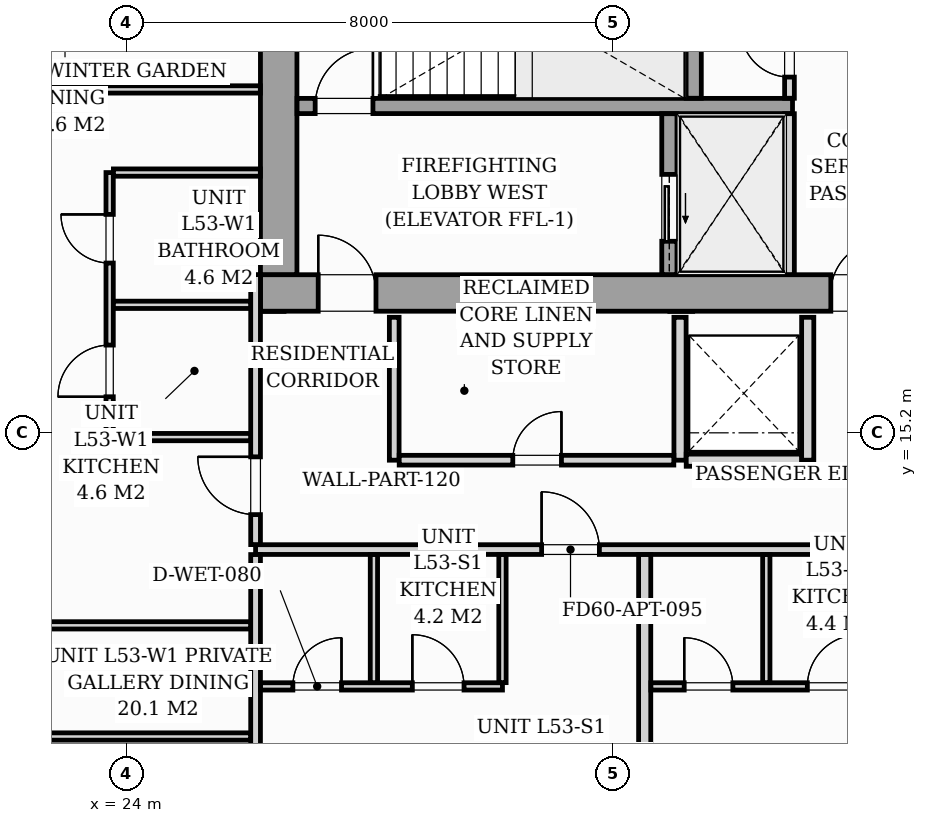
"""IFC4 building model, lengths in metres.
Left out: names, types, materials, properties, quantities, classifications, styles, units other than length and angle.
Written with IfcOpenShell. Run it as: python <this file> out.ifc"""

import sys

from ifc_helpers import new_model, si_unit, direction, frame, frame_2d, origin, origin_2d, place, context, subcontext, project, spatial, rectangle, i_section, extrude, source, transform, mapped, element, fill, save


model = new_model("IFC4")
c1 = context("Model", 3, precision=1e-05, world=origin(), true_north=direction((0.0, 1.0)))
c2 = subcontext(c1, "Body", "Model", "MODEL_VIEW")
j1 = project(units=[si_unit("LENGTHUNIT", "METRE"), si_unit("PLANEANGLEUNIT", "RADIAN")], contexts=[c1])
p1 = place(None, origin())
s1 = spatial("IfcSite", under=j1, at=p1, CompositionType="ELEMENT")
p2 = place(p1, origin())
s2 = spatial("IfcBuilding", under=s1, at=p2, CompositionType="ELEMENT")
p3 = place(p2, frame((0.0, 0.0, 185.8)))
s3 = spatial("IfcBuildingStorey", under=s2, at=p3, CompositionType="ELEMENT", Elevation=185.8)
m1 = source(origin(), c2, "Body", "SweptSolid", [
    extrude(i_section(OverallWidth=0.416, OverallDepth=0.446, WebThickness=0.039, FlangeThickness=0.063, FilletRadius=0.018, at=origin_2d()), origin(), (0.0, 0.0, 1.0), 3.196),
])
for number, where, z_axis, x_axis in (
    (1, (26.4, 17.4, 0.002), (0.0, 0.0, 1.0), (1.0, 0.0, 0.0)),
    (2, (33.12, 17.4, 0.002), (0.0, 0.0, 1.0), (1.0, 0.0, 0.0)),
):
    element("IfcColumn", number, at=place(p3, frame(where, z_axis=z_axis, x_axis=x_axis)), inside=s3, PredefinedType="PILASTER", context=c2, shape_type="MappedRepresentation", body=[
        mapped(m1, transform((0.0, 0.0, 0.0), scale=1.0)),
    ])
p4 = place(p3, frame((26.2, 17.5, 0.0), z_axis=(0.0, 0.0, 1.0), x_axis=(1.0, 0.0, 0.0)))
e3 = element("IfcWall", 3, at=p4, inside=s3, PredefinedType="SHEAR", context=c2, shape_type="SweptSolid", body=[
    extrude(rectangle(XDim=19.6, YDim=0.6, at=frame_2d((9.8, 0.0))), origin(), (0.0, 0.0, 1.0), 3.2),
])
p5 = place(p4, frame((0.95, 0.0, 0.0)))
e4 = element("IfcOpeningElement", 4, at=p5, cuts=e3, PredefinedType="OPENING", context=c2, shape_type="SweptSolid", body=[
    extrude(rectangle(XDim=0.95, YDim=2.06, at=frame_2d((0.475, 1.03))), frame((0.0, 0.31, 0.0), z_axis=(0.0, -1.0, 0.0), x_axis=(1.0, 0.0, 0.0)), (0.0, 0.0, 1.0), 0.62),
])
p6 = place(p4, frame((9.38, 0.0, 0.0)))
e5 = element("IfcOpeningElement", 5, at=p6, cuts=e3, PredefinedType="OPENING", context=c2, shape_type="SweptSolid", body=[
    extrude(rectangle(XDim=0.85, YDim=2.0, at=frame_2d((0.425, 1.0))), frame((0.0, 0.31, 0.0), z_axis=(0.0, -1.0, 0.0), x_axis=(1.0, 0.0, 0.0)), (0.0, 0.0, 1.0), 0.62),
])
p7 = place(p4, frame((17.55, 0.0, 0.0)))
e6 = element("IfcOpeningElement", 6, at=p7, cuts=e3, PredefinedType="OPENING", context=c2, shape_type="SweptSolid", body=[
    extrude(rectangle(XDim=0.95, YDim=2.06, at=frame_2d((0.475, 1.03))), frame((0.0, 0.31, 0.0), z_axis=(0.0, -1.0, 0.0), x_axis=(1.0, 0.0, 0.0)), (0.0, 0.0, 1.0), 0.62),
])
p8 = place(p3, frame((26.5, 17.802, 0.0), z_axis=(0.0, 0.0, 1.0), x_axis=(0.0, 1.0, 0.0)))
e7 = element("IfcWall", 7, at=p8, inside=s3, PredefinedType="SHEAR", context=c2, shape_type="SweptSolid", body=[
    extrude(rectangle(XDim=5.796, YDim=0.6, at=frame_2d((2.898, 0.0))), origin(), (0.0, 0.0, 1.0), 3.2),
])
p9 = place(p3, frame((26.802, 20.575, 0.0), z_axis=(0.0, 0.0, 1.0), x_axis=(1.0, 0.0, 0.0)))
e8 = element("IfcWall", 8, at=p9, inside=s3, PredefinedType="SOLIDWALL", context=c2, shape_type="SweptSolid", body=[
    extrude(rectangle(XDim=8.148, YDim=0.25, at=frame_2d((4.074, 0.0))), origin(), (0.0, 0.0, 1.0), 3.2),
])
p10 = place(p9, frame((0.298, 0.0, 0.0)))
e9 = element("IfcOpeningElement", 9, at=p10, cuts=e8, PredefinedType="OPENING", context=c2, shape_type="SweptSolid", body=[
    extrude(rectangle(XDim=0.95, YDim=2.06, at=frame_2d((0.475, 1.03))), frame((0.0, 0.135, 0.0), z_axis=(0.0, -1.0, 0.0), x_axis=(1.0, 0.0, 0.0)), (0.0, 0.0, 1.0), 0.27),
])
p11 = place(p3, frame((33.325, 20.702, 0.0), z_axis=(0.0, 0.0, 1.0), x_axis=(0.0, 1.0, 0.0)))
e10 = element("IfcWall", 10, at=p11, inside=s3, PredefinedType="SOLIDWALL", context=c2, shape_type="SweptSolid", body=[
    extrude(rectangle(XDim=2.896, YDim=0.25, at=frame_2d((1.448, 0.0))), origin(), (0.0, 0.0, 1.0), 3.2),
])
p12 = place(p3, frame((32.925, 17.802, 0.0), z_axis=(0.0, 0.0, 1.0), x_axis=(0.0, 1.0, 0.0)))
e11 = element("IfcWall", 11, at=p12, inside=s3, PredefinedType="SOLIDWALL", context=c2, shape_type="SweptSolid", body=[
    extrude(rectangle(XDim=2.646, YDim=0.25, at=frame_2d((1.323, 0.0))), origin(), (0.0, 0.0, 1.0), 3.2),
])
p13 = place(p12, frame((0.548, 0.0, 0.0)))
e12 = element("IfcOpeningElement", 12, at=p13, cuts=e11, PredefinedType="OPENING", context=c2, shape_type="SweptSolid", body=[
    extrude(rectangle(XDim=1.1, YDim=2.08, at=frame_2d((0.55, 1.04))), frame((0.0, 0.135, 0.0), z_axis=(0.0, -1.0, 0.0), x_axis=(1.0, 0.0, 0.0)), (0.0, 0.0, 1.0), 0.27),
])
p14 = place(p3, frame((34.9, 17.802, 0.0), z_axis=(0.0, 0.0, 1.0), x_axis=(0.0, 1.0, 0.0)))
e13 = element("IfcWall", 13, at=p14, inside=s3, PredefinedType="PARTITIONING", context=c2, shape_type="SweptSolid", body=[
    extrude(rectangle(XDim=2.646, YDim=0.16, at=frame_2d((1.323, 0.0))), origin(), (0.0, 0.0, 1.0), 2.94),
])
p15 = place(p3, frame((34.9, 20.702, 0.0), z_axis=(0.0, 0.0, 1.0), x_axis=(0.0, 1.0, 0.0)))
e14 = element("IfcWall", 14, at=p15, inside=s3, PredefinedType="PARTITIONING", context=c2, shape_type="SweptSolid", body=[
    extrude(rectangle(XDim=2.896, YDim=0.16, at=frame_2d((1.448, 0.0))), origin(), (0.0, 0.0, 1.0), 2.94),
])
p16 = place(p15, frame((0.348, 0.0, 0.0)))
e15 = element("IfcOpeningElement", 15, at=p16, cuts=e14, PredefinedType="OPENING", context=c2, shape_type="SweptSolid", body=[
    extrude(rectangle(XDim=0.8, YDim=2.05, at=frame_2d((0.4, 1.025))), frame((0.0, 0.09, 0.0), z_axis=(0.0, -1.0, 0.0), x_axis=(1.0, 0.0, 0.0)), (0.0, 0.0, 1.0), 0.18),
])
p17 = place(p3, frame((28.4, 14.75, 0.0), z_axis=(0.0, 0.0, 1.0), x_axis=(0.0, 1.0, 0.0)))
e16 = element("IfcWall", 16, at=p17, inside=s3, PredefinedType="PARTITIONING", context=c2, shape_type="SweptSolid", body=[
    extrude(rectangle(XDim=2.35, YDim=0.16, at=frame_2d((1.175, 0.0))), origin(), (0.0, 0.0, 1.0), 2.94),
])
p18 = place(p3, frame((33.1, 14.75, 0.0), z_axis=(0.0, 0.0, 1.0), x_axis=(0.0, 1.0, 0.0)))
e17 = element("IfcWall", 17, at=p18, inside=s3, PredefinedType="PARTITIONING", context=c2, shape_type="SweptSolid", body=[
    extrude(rectangle(XDim=2.35, YDim=0.2, at=frame_2d((1.175, 0.0))), origin(), (0.0, 0.0, 1.0), 2.94),
])
p19 = place(p3, frame((28.482, 14.75, 0.0), z_axis=(0.0, 0.0, 1.0), x_axis=(1.0, 0.0, 0.0)))
e18 = element("IfcWall", 18, at=p19, inside=s3, PredefinedType="PARTITIONING", context=c2, shape_type="SweptSolid", body=[
    extrude(rectangle(XDim=4.516, YDim=0.16, at=frame_2d((2.258, 0.0))), origin(), (0.0, 0.0, 1.0), 2.94),
])
p20 = place(p19, frame((1.868, 0.0, 0.0)))
e19 = element("IfcOpeningElement", 19, at=p20, cuts=e18, PredefinedType="OPENING", context=c2, shape_type="SweptSolid", body=[
    extrude(rectangle(XDim=0.8, YDim=2.05, at=frame_2d((0.4, 1.025))), frame((0.0, 0.09, 0.0), z_axis=(0.0, -1.0, 0.0), x_axis=(1.0, 0.0, 0.0)), (0.0, 0.0, 1.0), 0.18),
])
p21 = place(p3, frame((35.2, 14.75, 0.0), z_axis=(0.0, 0.0, 1.0), x_axis=(0.0, 1.0, 0.0)))
e20 = element("IfcWall", 20, at=p21, inside=s3, PredefinedType="PARTITIONING", context=c2, shape_type="SweptSolid", body=[
    extrude(rectangle(XDim=2.35, YDim=0.2, at=frame_2d((1.175, 0.0))), origin(), (0.0, 0.0, 1.0), 2.94),
])
p22 = place(p3, frame((33.202, 14.75, 0.0), z_axis=(0.0, 0.0, 1.0), x_axis=(1.0, 0.0, 0.0)))
e21 = element("IfcWall", 21, at=p22, inside=s3, PredefinedType="PARTITIONING", context=c2, shape_type="SweptSolid", body=[
    extrude(rectangle(XDim=1.896, YDim=0.2, at=frame_2d((0.948, 0.0))), origin(), (0.0, 0.0, 1.0), 2.94),
])
p23 = place(p3, frame((26.12, 13.28, 0.0), z_axis=(0.0, 0.0, 1.0), x_axis=(1.0, 0.0, 0.0)))
e22 = element("IfcWall", 22, at=p23, inside=s3, PredefinedType="PARTITIONING", context=c2, shape_type="SweptSolid", body=[
    extrude(rectangle(XDim=21.33, YDim=0.16, at=frame_2d((10.665, 0.0))), origin(), (0.0, 0.0, 1.0), 2.94),
])
p24 = place(p23, frame((4.704, 0.0, 0.0)))
e23 = element("IfcOpeningElement", 23, at=p24, cuts=e22, PredefinedType="OPENING", context=c2, shape_type="SweptSolid", body=[
    extrude(rectangle(XDim=0.95, YDim=2.06, at=frame_2d((0.475, 1.03))), frame((0.0, 0.09, 0.0), z_axis=(0.0, -1.0, 0.0), x_axis=(1.0, 0.0, 0.0)), (0.0, 0.0, 1.0), 0.18),
])
p25 = place(p23, frame((11.6, 0.0, 0.0)))
e24 = element("IfcOpeningElement", 24, at=p25, cuts=e22, PredefinedType="OPENING", context=c2, shape_type="SweptSolid", body=[
    extrude(rectangle(XDim=0.95, YDim=2.06, at=frame_2d((0.475, 1.03))), frame((0.0, 0.09, 0.0), z_axis=(0.0, -1.0, 0.0), x_axis=(1.0, 0.0, 0.0)), (0.0, 0.0, 1.0), 0.18),
])
p26 = place(p23, frame((14.976, 0.0, 0.0)))
e25 = element("IfcOpeningElement", 25, at=p26, cuts=e22, PredefinedType="OPENING", context=c2, shape_type="SweptSolid", body=[
    extrude(rectangle(XDim=0.95, YDim=2.06, at=frame_2d((0.475, 1.03))), frame((0.0, 0.09, 0.0), z_axis=(0.0, -1.0, 0.0), x_axis=(1.0, 0.0, 0.0)), (0.0, 0.0, 1.0), 0.18),
])
p27 = place(p3, frame((26.12, 7.261, 0.0), z_axis=(0.0, 0.0, 1.0), x_axis=(0.0, 1.0, 0.0)))
e26 = element("IfcWall", 26, at=p27, inside=s3, PredefinedType="PARTITIONING", context=c2, shape_type="SweptSolid", body=[
    extrude(rectangle(XDim=5.937, YDim=0.16, at=frame_2d((2.968, 0.0))), origin(), (0.0, 0.0, 1.0), 2.94),
])
p28 = place(p3, frame((26.12, 13.362, 0.0), z_axis=(0.0, 0.0, 1.0), x_axis=(0.0, 1.0, 0.0)))
e27 = element("IfcWall", 27, at=p28, inside=s3, PredefinedType="PARTITIONING", context=c2, shape_type="SweptSolid", body=[
    extrude(rectangle(XDim=4.44, YDim=0.16, at=frame_2d((2.22, 0.0))), origin(), (0.0, 0.0, 1.0), 2.94),
])
p29 = place(p28, frame((0.493, 0.0, 0.0)))
e28 = element("IfcOpeningElement", 28, at=p29, cuts=e27, PredefinedType="OPENING", context=c2, shape_type="SweptSolid", body=[
    extrude(rectangle(XDim=0.95, YDim=2.06, at=frame_2d((0.475, 1.03))), frame((0.0, 0.09, 0.0), z_axis=(0.0, -1.0, 0.0), x_axis=(1.0, 0.0, 0.0)), (0.0, 0.0, 1.0), 0.18),
])
p30 = place(p3, frame((26.202, 11.03, 0.0), z_axis=(0.0, 0.0, 1.0), x_axis=(1.0, 0.0, 0.0)))
e29 = element("IfcWall", 29, at=p30, inside=s3, PredefinedType="PARTITIONING", context=c2, shape_type="SweptSolid", body=[
    extrude(rectangle(XDim=3.978, YDim=0.12, at=frame_2d((1.989, 0.0))), origin(), (0.0, 0.0, 1.0), 2.94),
])
p31 = place(p30, frame((0.531, 0.0, 0.0)))
e30 = element("IfcOpeningElement", 30, at=p31, cuts=e29, PredefinedType="OPENING", context=c2, shape_type="SweptSolid", body=[
    extrude(rectangle(XDim=0.8, YDim=2.02, at=frame_2d((0.4, 1.01))), frame((0.0, 0.07, 0.0), z_axis=(0.0, -1.0, 0.0), x_axis=(1.0, 0.0, 0.0)), (0.0, 0.0, 1.0), 0.14),
])
p32 = place(p30, frame((2.496, 0.0, 0.0)))
e31 = element("IfcOpeningElement", 31, at=p32, cuts=e29, PredefinedType="OPENING", context=c2, shape_type="SweptSolid", body=[
    extrude(rectangle(XDim=0.85, YDim=2.05, at=frame_2d((0.425, 1.025))), frame((0.0, 0.07, 0.0), z_axis=(0.0, -1.0, 0.0), x_axis=(1.0, 0.0, 0.0)), (0.0, 0.0, 1.0), 0.14),
])
for number, where, z_axis, x_axis in (
    (32, (30.18, 11.092, 0.0), (0.0, 0.0, 1.0), (0.0, 1.0, 0.0)),
    (33, (28.066, 11.092, 0.0), (0.0, 0.0, 1.0), (0.0, 1.0, 0.0)),
):
    element("IfcWall", number, at=place(p3, frame(where, z_axis=z_axis, x_axis=x_axis)), inside=s3, PredefinedType="PARTITIONING", context=c2, shape_type="SweptSolid", body=[
        extrude(rectangle(XDim=2.106, YDim=0.12, at=frame_2d((1.053, 0.0))), origin(), (0.0, 0.0, 1.0), 2.94),
    ])
p33 = place(p3, frame((32.519, 7.877, 0.0), z_axis=(0.0, 0.0, 1.0), x_axis=(0.0, 1.0, 0.0)))
e34 = element("IfcWall", 34, at=p33, inside=s3, PredefinedType="PARTITIONING", context=c2, shape_type="SweptSolid", body=[
    extrude(rectangle(XDim=5.321, YDim=0.2, at=frame_2d((2.66, 0.0))), origin(), (0.0, 0.0, 1.0), 2.94),
])
p34 = place(p3, frame((32.621, 11.03, 0.0), z_axis=(0.0, 0.0, 1.0), x_axis=(1.0, 0.0, 0.0)))
e35 = element("IfcWall", 35, at=p34, inside=s3, PredefinedType="PARTITIONING", context=c2, shape_type="SweptSolid", body=[
    extrude(rectangle(XDim=4.098, YDim=0.12, at=frame_2d((2.049, 0.0))), origin(), (0.0, 0.0, 1.0), 2.94),
])
p35 = place(p34, frame((0.548, 0.0, 0.0)))
e36 = element("IfcOpeningElement", 36, at=p35, cuts=e35, PredefinedType="OPENING", context=c2, shape_type="SweptSolid", body=[
    extrude(rectangle(XDim=0.8, YDim=2.02, at=frame_2d((0.4, 1.01))), frame((0.0, 0.07, 0.0), z_axis=(0.0, -1.0, 0.0), x_axis=(1.0, 0.0, 0.0)), (0.0, 0.0, 1.0), 0.14),
])
p36 = place(p34, frame((2.573, 0.0, 0.0)))
e37 = element("IfcOpeningElement", 37, at=p36, cuts=e35, PredefinedType="OPENING", context=c2, shape_type="SweptSolid", body=[
    extrude(rectangle(XDim=0.85, YDim=2.05, at=frame_2d((0.425, 1.025))), frame((0.0, 0.07, 0.0), z_axis=(0.0, -1.0, 0.0), x_axis=(1.0, 0.0, 0.0)), (0.0, 0.0, 1.0), 0.14),
])
p37 = place(p3, frame((34.519, 11.092, 0.0), z_axis=(0.0, 0.0, 1.0), x_axis=(0.0, 1.0, 0.0)))
e38 = element("IfcWall", 38, at=p37, inside=s3, PredefinedType="PARTITIONING", context=c2, shape_type="SweptSolid", body=[
    extrude(rectangle(XDim=2.106, YDim=0.12, at=frame_2d((1.053, 0.0))), origin(), (0.0, 0.0, 1.0), 2.94),
])
p38 = place(p3, frame((23.72, 15.13, 0.0), z_axis=(0.0, 0.0, 1.0), x_axis=(0.0, 1.0, 0.0)))
e39 = element("IfcWall", 39, at=p38, inside=s3, PredefinedType="PARTITIONING", context=c2, shape_type="SweptSolid", body=[
    extrude(rectangle(XDim=4.35, YDim=0.12, at=frame_2d((2.175, 0.0))), origin(), (0.0, 0.0, 1.0), 2.94),
])
p39 = place(p38, frame((0.663, 0.0, 0.0)))
e40 = element("IfcOpeningElement", 40, at=p39, cuts=e39, PredefinedType="OPENING", context=c2, shape_type="SweptSolid", body=[
    extrude(rectangle(XDim=0.85, YDim=2.05, at=frame_2d((0.425, 1.025))), frame((0.0, 0.07, 0.0), z_axis=(0.0, -1.0, 0.0), x_axis=(1.0, 0.0, 0.0)), (0.0, 0.0, 1.0), 0.14),
])
p40 = place(p38, frame((2.862, 0.0, 0.0)))
e41 = element("IfcOpeningElement", 41, at=p40, cuts=e39, PredefinedType="OPENING", context=c2, shape_type="SweptSolid", body=[
    extrude(rectangle(XDim=0.8, YDim=2.02, at=frame_2d((0.4, 1.01))), frame((0.0, 0.07, 0.0), z_axis=(0.0, -1.0, 0.0), x_axis=(1.0, 0.0, 0.0)), (0.0, 0.0, 1.0), 0.14),
])
p41 = place(p3, frame((23.782, 17.305, 0.0), z_axis=(0.0, 0.0, 1.0), x_axis=(1.0, 0.0, 0.0)))
e42 = element("IfcWall", 42, at=p41, inside=s3, PredefinedType="PARTITIONING", context=c2, shape_type="SweptSolid", body=[
    extrude(rectangle(XDim=2.256, YDim=0.12, at=frame_2d((1.128, 0.0))), origin(), (0.0, 0.0, 1.0), 2.281),
])
p42 = place(p3, frame((23.782, 15.13, 0.0), z_axis=(0.0, 0.0, 1.0), x_axis=(1.0, 0.0, 0.0)))
e43 = element("IfcWall", 43, at=p42, inside=s3, PredefinedType="PARTITIONING", context=c2, shape_type="SweptSolid", body=[
    extrude(rectangle(XDim=2.256, YDim=0.12, at=frame_2d((1.128, 0.0))), origin(), (0.0, 0.0, 1.0), 2.94),
])
p43 = place(p3, frame((23.782, 19.48, 0.0), z_axis=(0.0, 0.0, 1.0), x_axis=(1.0, 0.0, 0.0)))
e44 = element("IfcWall", 44, at=p43, inside=s3, PredefinedType="PARTITIONING", context=c2, shape_type="SweptSolid", body=[
    extrude(rectangle(XDim=2.416, YDim=0.12, at=frame_2d((1.208, 0.0))), origin(), (0.0, 0.0, 1.0), 2.94),
])
p44 = place(p3, frame((14.365, 10.206, 0.0), z_axis=(0.0, 0.0, 1.0), x_axis=(1.0, 0.0, 0.0)))
e45 = element("IfcWall", 45, at=p44, inside=s3, PredefinedType="PARTITIONING", context=c2, shape_type="SweptSolid", body=[
    extrude(rectangle(XDim=11.673, YDim=0.12, at=frame_2d((5.837, 0.0))), origin(), (0.0, 0.0, 1.0), 2.94),
])
p45 = place(p44, frame((5.405, 0.0, 0.0)))
e46 = element("IfcOpeningElement", 46, at=p45, cuts=e45, PredefinedType="OPENING", context=c2, shape_type="SweptSolid", body=[
    extrude(rectangle(XDim=0.85, YDim=2.05, at=frame_2d((0.425, 1.025))), frame((0.0, 0.07, 0.0), z_axis=(0.0, -1.0, 0.0), x_axis=(1.0, 0.0, 0.0)), (0.0, 0.0, 1.0), 0.14),
])
p46 = place(p3, frame((14.189, 12.034, 0.0), z_axis=(0.0, 0.0, 1.0), x_axis=(1.0, 0.0, 0.0)))
e47 = element("IfcWall", 47, at=p46, inside=s3, PredefinedType="PARTITIONING", context=c2, shape_type="SweptSolid", body=[
    extrude(rectangle(XDim=11.849, YDim=0.12, at=frame_2d((5.925, 0.0))), origin(), (0.0, 0.0, 1.0), 2.94),
])
p47 = place(p46, frame((5.493, 0.0, 0.0)))
e48 = element("IfcOpeningElement", 48, at=p47, cuts=e47, PredefinedType="OPENING", context=c2, shape_type="SweptSolid", body=[
    extrude(rectangle(XDim=0.85, YDim=2.05, at=frame_2d((0.425, 1.025))), frame((0.0, 0.07, 0.0), z_axis=(0.0, -1.0, 0.0), x_axis=(1.0, 0.0, 0.0)), (0.0, 0.0, 1.0), 0.14),
])
p48 = place(p3, frame((13.34, 20.847, 0.0), z_axis=(0.0, 0.0, 1.0), x_axis=(1.0, 0.0, 0.0)))
e49 = element("IfcWall", 49, at=p48, inside=s3, PredefinedType="PARTITIONING", context=c2, shape_type="SweptSolid", body=[
    extrude(rectangle(XDim=12.858, YDim=0.12, at=frame_2d((6.429, 0.0))), origin(), (0.0, 0.0, 1.0), 2.94),
])
p49 = place(p48, frame((5.875, 0.0, 0.0)))
e50 = element("IfcOpeningElement", 50, at=p49, cuts=e49, PredefinedType="OPENING", context=c2, shape_type="SweptSolid", body=[
    extrude(rectangle(XDim=0.85, YDim=2.05, at=frame_2d((0.425, 1.025))), frame((0.0, 0.07, 0.0), z_axis=(0.0, -1.0, 0.0), x_axis=(1.0, 0.0, 0.0)), (0.0, 0.0, 1.0), 0.14),
])
m2 = source(origin(), c2, "Body", "SweptSolid", [
    extrude(rectangle(XDim=0.95, YDim=2.06, at=frame_2d((0.475, 1.03))), frame((0.0, 0.025, 0.0), z_axis=(0.0, -1.0, 0.0), x_axis=(1.0, 0.0, 0.0)), (0.0, 0.0, 1.0), 0.05),
])
p50 = place(p5, origin())
e51 = element("IfcDoor", 51, at=p50, inside=s3, OperationType="SINGLE_SWING_LEFT", PredefinedType="DOOR", context=c2, shape_type="MappedRepresentation", body=[
    mapped(m2, transform((0.0, 0.0, 0.0), scale=1.0)),
])
fill(e4, e51)
m3 = source(origin(), c2, "Body", "SweptSolid", [
    extrude(rectangle(XDim=0.85, YDim=2.0, at=frame_2d((0.425, 1.0))), frame((0.0, 0.025, 0.0), z_axis=(0.0, -1.0, 0.0), x_axis=(1.0, 0.0, 0.0)), (0.0, 0.0, 1.0), 0.05),
])
p51 = place(p6, origin())
e52 = element("IfcDoor", 52, at=p51, inside=s3, OperationType="SINGLE_SWING_RIGHT", PredefinedType="DOOR", context=c2, shape_type="MappedRepresentation", body=[
    mapped(m3, transform((0.0, 0.0, 0.0), scale=1.0)),
])
fill(e5, e52)
p52 = place(p10, origin())
e53 = element("IfcDoor", 53, at=p52, inside=s3, OperationType="SINGLE_SWING_RIGHT", PredefinedType="DOOR", context=c2, shape_type="MappedRepresentation", body=[
    mapped(m2, transform((0.0, 0.0, 0.0), scale=1.0)),
])
fill(e9, e53)
m4 = source(origin(), c2, "Body", "SweptSolid", [
    extrude(rectangle(XDim=1.1, YDim=2.08, at=frame_2d((0.55, 1.04))), frame((0.0, 0.025, 0.0), z_axis=(0.0, -1.0, 0.0), x_axis=(1.0, 0.0, 0.0)), (0.0, 0.0, 1.0), 0.05),
])
p53 = place(p13, origin())
e54 = element("IfcDoor", 54, at=p53, inside=s3, OperationType="SLIDING_TO_LEFT", PredefinedType="DOOR", context=c2, shape_type="MappedRepresentation", body=[
    mapped(m4, transform((0.0, 0.0, 0.0), scale=1.0)),
])
fill(e12, e54)
m5 = source(origin(), c2, "Body", "SweptSolid", [
    extrude(rectangle(XDim=0.8, YDim=2.05, at=frame_2d((0.4, 1.025))), frame((0.0, 0.025, 0.0), z_axis=(0.0, -1.0, 0.0), x_axis=(1.0, 0.0, 0.0)), (0.0, 0.0, 1.0), 0.05),
])
p54 = place(p16, origin())
e55 = element("IfcDoor", 55, at=p54, inside=s3, OperationType="SINGLE_SWING_RIGHT", PredefinedType="DOOR", context=c2, shape_type="MappedRepresentation", body=[
    mapped(m5, transform((0.0, 0.0, 0.0), scale=1.0)),
])
fill(e15, e55)
p55 = place(p20, origin())
e56 = element("IfcDoor", 56, at=p55, inside=s3, OperationType="SINGLE_SWING_RIGHT", PredefinedType="DOOR", context=c2, shape_type="MappedRepresentation", body=[
    mapped(m5, transform((0.0, 0.0, 0.0), scale=1.0)),
])
fill(e19, e56)
m6 = source(origin(), c2, "Body", "SweptSolid", [
    extrude(rectangle(XDim=0.95, YDim=2.06, at=frame_2d((0.475, 1.03))), frame((0.0, 0.025, 0.0), z_axis=(0.0, -1.0, 0.0), x_axis=(1.0, 0.0, 0.0)), (0.0, 0.0, 1.0), 0.05),
])
p56 = place(p24, origin())
e57 = element("IfcDoor", 57, at=p56, inside=s3, OperationType="SINGLE_SWING_LEFT", PredefinedType="DOOR", context=c2, shape_type="MappedRepresentation", body=[
    mapped(m6, transform((0.0, 0.0, 0.0), scale=1.0)),
])
fill(e23, e57)
m7 = source(origin(), c2, "Body", "SweptSolid", [
    extrude(rectangle(XDim=0.8, YDim=2.02, at=frame_2d((0.4, 1.01))), frame((0.0, 0.025, 0.0), z_axis=(0.0, -1.0, 0.0), x_axis=(1.0, 0.0, 0.0)), (0.0, 0.0, 1.0), 0.05),
])
p57 = place(p31, origin())
e58 = element("IfcDoor", 58, at=p57, inside=s3, OperationType="SINGLE_SWING_RIGHT", PredefinedType="DOOR", context=c2, shape_type="MappedRepresentation", body=[
    mapped(m7, transform((0.0, 0.0, 0.0), scale=1.0)),
])
fill(e30, e58)
m8 = source(origin(), c2, "Body", "SweptSolid", [
    extrude(rectangle(XDim=0.85, YDim=2.05, at=frame_2d((0.425, 1.025))), frame((0.0, 0.025, 0.0), z_axis=(0.0, -1.0, 0.0), x_axis=(1.0, 0.0, 0.0)), (0.0, 0.0, 1.0), 0.05),
])
p58 = place(p32, origin())
e59 = element("IfcDoor", 59, at=p58, inside=s3, OperationType="SINGLE_SWING_LEFT", PredefinedType="DOOR", context=c2, shape_type="MappedRepresentation", body=[
    mapped(m8, transform((0.0, 0.0, 0.0), scale=1.0)),
])
fill(e31, e59)
p59 = place(p35, origin())
e60 = element("IfcDoor", 60, at=p59, inside=s3, OperationType="SINGLE_SWING_LEFT", PredefinedType="DOOR", context=c2, shape_type="MappedRepresentation", body=[
    mapped(m7, transform((0.0, 0.0, 0.0), scale=1.0)),
])
fill(e36, e60)
p60 = place(p36, origin())
e61 = element("IfcDoor", 61, at=p60, inside=s3, OperationType="SINGLE_SWING_RIGHT", PredefinedType="DOOR", context=c2, shape_type="MappedRepresentation", body=[
    mapped(m8, transform((0.0, 0.0, 0.0), scale=1.0)),
])
fill(e37, e61)
p61 = place(p29, origin())
e62 = element("IfcDoor", 62, at=p61, inside=s3, OperationType="SINGLE_SWING_RIGHT", PredefinedType="DOOR", context=c2, shape_type="MappedRepresentation", body=[
    mapped(m6, transform((0.0, 0.0, 0.0), scale=1.0)),
])
fill(e28, e62)
p62 = place(p39, origin())
e63 = element("IfcDoor", 63, at=p62, inside=s3, OperationType="SINGLE_SWING_LEFT", PredefinedType="DOOR", context=c2, shape_type="MappedRepresentation", body=[
    mapped(m8, transform((0.0, 0.0, 0.0), scale=1.0)),
])
fill(e40, e63)
p63 = place(p40, origin())
e64 = element("IfcDoor", 64, at=p63, inside=s3, OperationType="SINGLE_SWING_RIGHT", PredefinedType="DOOR", context=c2, shape_type="MappedRepresentation", body=[
    mapped(m7, transform((0.0, 0.0, 0.0), scale=1.0)),
])
fill(e41, e64)
save(model, sys.argv[1])
